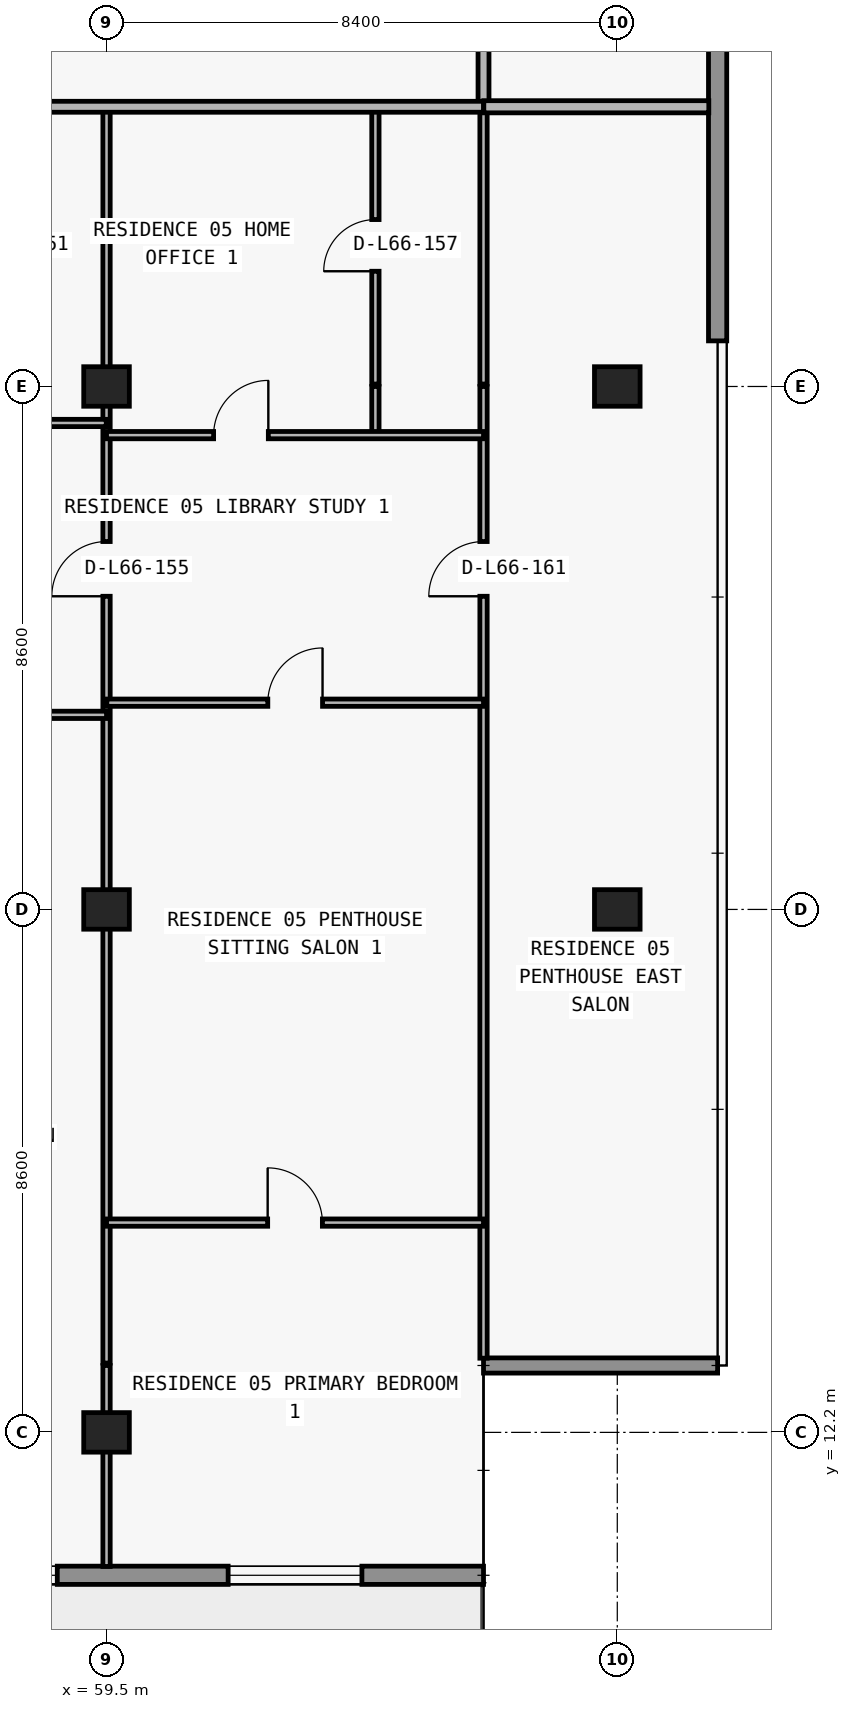
"""IFC4 building model, lengths in metres.
Left out: names, types, materials, properties, quantities, classifications, styles, units other than length and angle.
Written with IfcOpenShell. Run it as: python <this file> out.ifc"""

import sys

from ifc_helpers import new_model, si_unit, direction, frame, frame_2d, origin, origin_2d, place, context, subcontext, project, spatial, rectangle, extrude, element, fill, save


model = new_model("IFC4")
c1 = context("Model", 3, precision=1e-05, world=origin(), true_north=direction((0.0, 1.0)))
c2 = subcontext(c1, "Body", "Model", "MODEL_VIEW")
j1 = project(units=[si_unit("LENGTHUNIT", "METRE"), si_unit("PLANEANGLEUNIT", "RADIAN")], contexts=[c1])
p1 = place(None, origin())
s1 = spatial("IfcSite", under=j1, at=p1, CompositionType="ELEMENT")
p2 = place(p1, origin())
s2 = spatial("IfcBuilding", under=s1, at=p2, CompositionType="ELEMENT")
p3 = place(p2, frame((0.0, 0.0, 236.4)))
s3 = spatial("IfcBuildingStorey", under=s2, at=p3, CompositionType="ELEMENT", Elevation=236.4)
for number, where, z_axis, x_axis in (
    (1, (59.5, 12.2, 0.0), (0.0, 0.0, 1.0), (1.0, 0.0, 0.0)),
    (2, (59.5, 20.8, 0.0), (0.0, 0.0, 1.0), (1.0, 0.0, 0.0)),
    (3, (67.9, 20.8, 0.0), (0.0, 0.0, 1.0), (1.0, 0.0, 0.0)),
    (4, (59.5, 29.4, 0.0), (0.0, 0.0, 1.0), (1.0, 0.0, 0.0)),
    (5, (67.9, 29.4, 0.0), (0.0, 0.0, 1.0), (1.0, 0.0, 0.0)),
):
    element("IfcColumn", number, at=place(p3, frame(where, z_axis=z_axis, x_axis=x_axis)), inside=s3, PredefinedType="COLUMN", context=c2, shape_type="SweptSolid", body=[
        extrude(rectangle(XDim=0.75, YDim=0.65, at=origin_2d()), origin(), (0.0, 0.0, 1.0), 3.05),
    ])
p4 = place(p3, frame((65.7, 9.85, 0.0), z_axis=(0.0, 0.0, 1.0), x_axis=(-1.0, 0.0, 0.0)))
e6 = element("IfcWall", 6, at=p4, inside=s3, PredefinedType="STANDARD", context=c2, shape_type="SweptSolid", body=[
    extrude(rectangle(XDim=53.6, YDim=0.3, at=frame_2d((26.8, 0.0))), origin(), (0.0, 0.0, 1.0), 3.05),
])
p5 = place(p4, frame((49.5, 0.0, 0.0)))
e7 = element("IfcOpeningElement", 7, at=p5, cuts=e6, PredefinedType="OPENING", context=c2, shape_type="SweptSolid", body=[
    extrude(rectangle(XDim=2.0, YDim=2.3, at=frame_2d((1.0, 1.15))), frame((0.0, 0.16, 0.0), z_axis=(0.0, -1.0, 0.0), x_axis=(1.0, 0.0, 0.0)), (0.0, 0.0, 1.0), 0.32),
])
p6 = place(p4, frame((42.1, 0.0, 0.85)))
e8 = element("IfcOpeningElement", 8, at=p6, cuts=e6, PredefinedType="OPENING", context=c2, shape_type="SweptSolid", body=[
    extrude(rectangle(XDim=2.2, YDim=1.55, at=frame_2d((1.1, 0.775))), frame((0.0, 0.16, 0.0), z_axis=(0.0, -1.0, 0.0), x_axis=(1.0, 0.0, 0.0)), (0.0, 0.0, 1.0), 0.32),
])
p7 = place(p4, frame((35.69, 0.0, 0.0)))
e9 = element("IfcOpeningElement", 9, at=p7, cuts=e6, PredefinedType="OPENING", context=c2, shape_type="SweptSolid", body=[
    extrude(rectangle(XDim=2.0, YDim=2.3, at=frame_2d((1.0, 1.15))), frame((0.0, 0.16, 0.0), z_axis=(0.0, -1.0, 0.0), x_axis=(1.0, 0.0, 0.0)), (0.0, 0.0, 1.0), 0.32),
])
p8 = place(p4, frame((31.59, 0.0, 0.85)))
e10 = element("IfcOpeningElement", 10, at=p8, cuts=e6, PredefinedType="OPENING", context=c2, shape_type="SweptSolid", body=[
    extrude(rectangle(XDim=1.8, YDim=1.55, at=frame_2d((0.9, 0.775))), frame((0.0, 0.16, 0.0), z_axis=(0.0, -1.0, 0.0), x_axis=(1.0, 0.0, 0.0)), (0.0, 0.0, 1.0), 0.32),
])
p9 = place(p4, frame((23.914, 0.0, 0.85)))
e11 = element("IfcOpeningElement", 11, at=p9, cuts=e6, PredefinedType="OPENING", context=c2, shape_type="SweptSolid", body=[
    extrude(rectangle(XDim=2.2, YDim=1.55, at=frame_2d((1.1, 0.775))), frame((0.0, 0.16, 0.0), z_axis=(0.0, -1.0, 0.0), x_axis=(1.0, 0.0, 0.0)), (0.0, 0.0, 1.0), 0.32),
])
p10 = place(p4, frame((19.69, 0.0, 0.0)))
e12 = element("IfcOpeningElement", 12, at=p10, cuts=e6, PredefinedType="OPENING", context=c2, shape_type="SweptSolid", body=[
    extrude(rectangle(XDim=2.0, YDim=2.3, at=frame_2d((1.0, 1.15))), frame((0.0, 0.16, 0.0), z_axis=(0.0, -1.0, 0.0), x_axis=(1.0, 0.0, 0.0)), (0.0, 0.0, 1.0), 0.32),
])
p11 = place(p4, frame((15.59, 0.0, 0.85)))
e13 = element("IfcOpeningElement", 13, at=p11, cuts=e6, PredefinedType="OPENING", context=c2, shape_type="SweptSolid", body=[
    extrude(rectangle(XDim=1.8, YDim=1.55, at=frame_2d((0.9, 0.775))), frame((0.0, 0.16, 0.0), z_axis=(0.0, -1.0, 0.0), x_axis=(1.0, 0.0, 0.0)), (0.0, 0.0, 1.0), 0.32),
])
p12 = place(p4, frame((11.69, 0.0, 0.0)))
e14 = element("IfcOpeningElement", 14, at=p12, cuts=e6, PredefinedType="OPENING", context=c2, shape_type="SweptSolid", body=[
    extrude(rectangle(XDim=2.0, YDim=2.3, at=frame_2d((1.0, 1.15))), frame((0.0, 0.16, 0.0), z_axis=(0.0, -1.0, 0.0), x_axis=(1.0, 0.0, 0.0)), (0.0, 0.0, 1.0), 0.32),
])
p13 = place(p4, frame((7.01, 0.0, 0.65)))
e15 = element("IfcOpeningElement", 15, at=p13, cuts=e6, PredefinedType="OPENING", context=c2, shape_type="SweptSolid", body=[
    extrude(rectangle(XDim=2.6, YDim=1.85, at=frame_2d((1.3, 0.925))), frame((0.0, 0.16, 0.0), z_axis=(0.0, -1.0, 0.0), x_axis=(1.0, 0.0, 0.0)), (0.0, 0.0, 1.0), 0.32),
])
p14 = place(p4, frame((2.0, 0.0, 0.85)))
e16 = element("IfcOpeningElement", 16, at=p14, cuts=e6, PredefinedType="OPENING", context=c2, shape_type="SweptSolid", body=[
    extrude(rectangle(XDim=2.2, YDim=1.55, at=frame_2d((1.1, 0.775))), frame((0.0, 0.16, 0.0), z_axis=(0.0, -1.0, 0.0), x_axis=(1.0, 0.0, 0.0)), (0.0, 0.0, 1.0), 0.32),
])
p15 = place(p3, frame((65.7, 13.3, 0.0), z_axis=(0.0, 0.0, 1.0), x_axis=(1.0, 0.0, 0.0)))
e17 = element("IfcWall", 17, at=p15, inside=s3, PredefinedType="ELEMENTEDWALL", context=c2, shape_type="SweptSolid", body=[
    extrude(rectangle(XDim=3.85, YDim=0.25, at=frame_2d((1.925, 0.0))), origin(), (0.0, 0.0, 1.0), 3.05),
])
p16 = place(p3, frame((69.55, 47.0, 0.0), z_axis=(0.0, 0.0, 1.0), x_axis=(0.0, -1.0, 0.0)))
e18 = element("IfcWall", 18, at=p16, inside=s3, PredefinedType="STANDARD", context=c2, shape_type="SweptSolid", body=[
    extrude(rectangle(XDim=16.85, YDim=0.3, at=frame_2d((8.425, 0.0))), origin(), (0.0, 0.0, 1.0), 3.05),
])
p17 = place(p3, frame((59.5, 9.995, 0.0), z_axis=(0.0, 0.0, 1.0), x_axis=(0.0, 1.0, 0.0)))
e19 = element("IfcWall", 19, at=p17, inside=s3, PredefinedType="PARTITIONING", context=c2, shape_type="SweptSolid", body=[
    extrude(rectangle(XDim=3.305, YDim=0.12, at=frame_2d((1.652, 0.0))), origin(), (0.0, 0.0, 1.0), 2.263),
])
p18 = place(p3, frame((59.5, 13.34, 0.0), z_axis=(0.0, 0.0, 1.0), x_axis=(0.0, 1.0, 0.0)))
e20 = element("IfcWall", 20, at=p18, inside=s3, PredefinedType="PARTITIONING", context=c2, shape_type="SweptSolid", body=[
    extrude(rectangle(XDim=16.06, YDim=0.12, at=frame_2d((8.03, 0.0))), origin(), (0.0, 0.0, 1.0), 2.263),
])
p19 = place(p18, frame((12.61, 0.0, 0.0)))
e21 = element("IfcOpeningElement", 21, at=p19, cuts=e20, PredefinedType="OPENING", context=c2, shape_type="SweptSolid", body=[
    extrude(rectangle(XDim=0.9, YDim=2.15, at=frame_2d((0.45, 1.075))), frame((0.0, 0.07, 0.0), z_axis=(0.0, -1.0, 0.0), x_axis=(1.0, 0.0, 0.0)), (0.0, 0.0, 1.0), 0.14),
])
p20 = place(p3, frame((59.5, 29.44, 0.0), z_axis=(0.0, 0.0, 1.0), x_axis=(0.0, 1.0, 0.0)))
e22 = element("IfcWall", 22, at=p20, inside=s3, PredefinedType="PARTITIONING", context=c2, shape_type="SweptSolid", body=[
    extrude(rectangle(XDim=4.56, YDim=0.12, at=frame_2d((2.28, 0.0))), origin(), (0.0, 0.0, 1.0), 2.263),
])
p21 = place(p3, frame((63.922, 28.6, 0.0), z_axis=(0.0, 0.0, 1.0), x_axis=(0.0, 1.0, 0.0)))
e23 = element("IfcWall", 23, at=p21, inside=s3, PredefinedType="PARTITIONING", context=c2, shape_type="SweptSolid", body=[
    extrude(rectangle(XDim=0.8, YDim=0.12, at=frame_2d((0.4, 0.0))), origin(), (0.0, 0.0, 1.0), 3.05),
])
p22 = place(p3, frame((63.922, 29.44, 0.0), z_axis=(0.0, 0.0, 1.0), x_axis=(0.0, 1.0, 0.0)))
e24 = element("IfcWall", 24, at=p22, inside=s3, PredefinedType="PARTITIONING", context=c2, shape_type="SweptSolid", body=[
    extrude(rectangle(XDim=4.56, YDim=0.12, at=frame_2d((2.28, 0.0))), origin(), (0.0, 0.0, 1.0), 3.05),
])
p23 = place(p22, frame((1.855, 0.0, 0.0)))
e25 = element("IfcOpeningElement", 25, at=p23, cuts=e24, PredefinedType="OPENING", context=c2, shape_type="SweptSolid", body=[
    extrude(rectangle(XDim=0.85, YDim=2.1, at=frame_2d((0.425, 1.05))), frame((0.0, 0.07, 0.0), z_axis=(0.0, -1.0, 0.0), x_axis=(1.0, 0.0, 0.0)), (0.0, 0.0, 1.0), 0.14),
])
p24 = place(p3, frame((65.7, 13.42, 0.0), z_axis=(0.0, 0.0, 1.0), x_axis=(0.0, 1.0, 0.0)))
e26 = element("IfcWall", 26, at=p24, inside=s3, PredefinedType="PARTITIONING", context=c2, shape_type="SweptSolid", body=[
    extrude(rectangle(XDim=15.98, YDim=0.12, at=frame_2d((7.99, 0.0))), origin(), (0.0, 0.0, 1.0), 2.629),
])
p25 = place(p24, frame((12.53, 0.0, 0.0)))
e27 = element("IfcOpeningElement", 27, at=p25, cuts=e26, PredefinedType="OPENING", context=c2, shape_type="SweptSolid", body=[
    extrude(rectangle(XDim=0.9, YDim=2.15, at=frame_2d((0.45, 1.075))), frame((0.0, 0.07, 0.0), z_axis=(0.0, -1.0, 0.0), x_axis=(1.0, 0.0, 0.0)), (0.0, 0.0, 1.0), 0.14),
])
p26 = place(p3, frame((65.7, 29.44, 0.0), z_axis=(0.0, 0.0, 1.0), x_axis=(0.0, 1.0, 0.0)))
e28 = element("IfcWall", 28, at=p26, inside=s3, PredefinedType="PARTITIONING", context=c2, shape_type="SweptSolid", body=[
    extrude(rectangle(XDim=4.56, YDim=0.12, at=frame_2d((2.28, 0.0))), origin(), (0.0, 0.0, 1.0), 2.629),
])
p27 = place(p3, frame((65.7, 34.005, 0.0), z_axis=(0.0, 0.0, 1.0), x_axis=(0.0, 1.0, 0.0)))
e29 = element("IfcWall", 29, at=p27, inside=s3, PredefinedType="PARTITIONING", context=c2, shape_type="SweptSolid", body=[
    extrude(rectangle(XDim=2.995, YDim=0.18, at=frame_2d((1.498, 0.0))), origin(), (0.0, 0.0, 1.0), 2.629),
])
p28 = place(p3, frame((59.5, 15.65, 0.0), z_axis=(0.0, 0.0, 1.0), x_axis=(1.0, 0.0, 0.0)))
e30 = element("IfcWall", 30, at=p28, inside=s3, PredefinedType="PARTITIONING", context=c2, shape_type="SweptSolid", body=[
    extrude(rectangle(XDim=6.2, YDim=0.12, at=frame_2d((3.1, 0.0))), origin(), (0.0, 0.0, 1.0), 3.05),
])
p29 = place(p28, frame((2.65, 0.0, 0.0)))
e31 = element("IfcOpeningElement", 31, at=p29, cuts=e30, PredefinedType="OPENING", context=c2, shape_type="SweptSolid", body=[
    extrude(rectangle(XDim=0.9, YDim=2.15, at=frame_2d((0.45, 1.075))), frame((0.0, 0.07, 0.0), z_axis=(0.0, -1.0, 0.0), x_axis=(1.0, 0.0, 0.0)), (0.0, 0.0, 1.0), 0.14),
])
p30 = place(p3, frame((51.32, 24.0, 0.0), z_axis=(0.0, 0.0, 1.0), x_axis=(1.0, 0.0, 0.0)))
e32 = element("IfcWall", 32, at=p30, inside=s3, PredefinedType="PARTITIONING", context=c2, shape_type="SweptSolid", body=[
    extrude(rectangle(XDim=8.18, YDim=0.12, at=frame_2d((4.09, 0.0))), origin(), (0.0, 0.0, 1.0), 3.05),
])
p31 = place(p30, frame((1.33, 0.0, 0.0)))
e33 = element("IfcOpeningElement", 33, at=p31, cuts=e32, PredefinedType="OPENING", context=c2, shape_type="SweptSolid", body=[
    extrude(rectangle(XDim=0.9, YDim=2.15, at=frame_2d((0.45, 1.075))), frame((0.0, 0.07, 0.0), z_axis=(0.0, -1.0, 0.0), x_axis=(1.0, 0.0, 0.0)), (0.0, 0.0, 1.0), 0.14),
])
p32 = place(p3, frame((59.505, 24.2, 0.0), z_axis=(0.0, 0.0, 1.0), x_axis=(1.0, 0.0, 0.0)))
e34 = element("IfcWall", 34, at=p32, inside=s3, PredefinedType="PARTITIONING", context=c2, shape_type="SweptSolid", body=[
    extrude(rectangle(XDim=6.195, YDim=0.12, at=frame_2d((3.098, 0.0))), origin(), (0.0, 0.0, 1.0), 3.05),
])
p33 = place(p32, frame((2.647, 0.0, 0.0)))
e35 = element("IfcOpeningElement", 35, at=p33, cuts=e34, PredefinedType="OPENING", context=c2, shape_type="SweptSolid", body=[
    extrude(rectangle(XDim=0.9, YDim=2.15, at=frame_2d((0.45, 1.075))), frame((0.0, 0.07, 0.0), z_axis=(0.0, -1.0, 0.0), x_axis=(1.0, 0.0, 0.0)), (0.0, 0.0, 1.0), 0.14),
])
p34 = place(p3, frame((59.5, 28.6, 0.0), z_axis=(0.0, 0.0, 1.0), x_axis=(1.0, 0.0, 0.0)))
e36 = element("IfcWall", 36, at=p34, inside=s3, PredefinedType="PARTITIONING", context=c2, shape_type="SweptSolid", body=[
    extrude(rectangle(XDim=6.2, YDim=0.12, at=frame_2d((3.1, 0.0))), origin(), (0.0, 0.0, 1.0), 3.05),
])
p35 = place(p34, frame((1.761, 0.0, 0.0)))
e37 = element("IfcOpeningElement", 37, at=p35, cuts=e36, PredefinedType="OPENING", context=c2, shape_type="SweptSolid", body=[
    extrude(rectangle(XDim=0.9, YDim=2.15, at=frame_2d((0.45, 1.075))), frame((0.0, 0.07, 0.0), z_axis=(0.0, -1.0, 0.0), x_axis=(1.0, 0.0, 0.0)), (0.0, 0.0, 1.0), 0.14),
])
p36 = place(p3, frame((51.32, 28.8, 0.0), z_axis=(0.0, 0.0, 1.0), x_axis=(1.0, 0.0, 0.0)))
e38 = element("IfcWall", 38, at=p36, inside=s3, PredefinedType="PARTITIONING", context=c2, shape_type="SweptSolid", body=[
    extrude(rectangle(XDim=8.175, YDim=0.12, at=frame_2d((4.087, 0.0))), origin(), (0.0, 0.0, 1.0), 3.05),
])
p37 = place(p36, frame((1.33, 0.0, 0.0)))
e39 = element("IfcOpeningElement", 39, at=p37, cuts=e38, PredefinedType="OPENING", context=c2, shape_type="SweptSolid", body=[
    extrude(rectangle(XDim=0.9, YDim=2.15, at=frame_2d((0.45, 1.075))), frame((0.0, 0.07, 0.0), z_axis=(0.0, -1.0, 0.0), x_axis=(1.0, 0.0, 0.0)), (0.0, 0.0, 1.0), 0.14),
])
p38 = place(p3, frame((12.105, 34.0, 0.0), z_axis=(0.0, 0.0, 1.0), x_axis=(1.0, 0.0, 0.0)))
e40 = element("IfcWall", 40, at=p38, inside=s3, PredefinedType="PARTITIONING", context=c2, shape_type="SweptSolid", body=[
    extrude(rectangle(XDim=53.595, YDim=0.18, at=frame_2d((26.797, 0.0))), origin(), (0.0, 0.0, 1.0), 3.05),
])
p39 = place(p38, frame((1.607, 0.0, 0.0)))
e41 = element("IfcOpeningElement", 41, at=p39, cuts=e40, PredefinedType="OPENING", context=c2, shape_type="SweptSolid", body=[
    extrude(rectangle(XDim=1.0, YDim=2.2, at=frame_2d((0.5, 1.1))), frame((0.0, 0.1, 0.0), z_axis=(0.0, -1.0, 0.0), x_axis=(1.0, 0.0, 0.0)), (0.0, 0.0, 1.0), 0.2),
])
p40 = place(p38, frame((17.057, 0.0, 0.0)))
e42 = element("IfcOpeningElement", 42, at=p40, cuts=e40, PredefinedType="OPENING", context=c2, shape_type="SweptSolid", body=[
    extrude(rectangle(XDim=1.0, YDim=2.2, at=frame_2d((0.5, 1.1))), frame((0.0, 0.1, 0.0), z_axis=(0.0, -1.0, 0.0), x_axis=(1.0, 0.0, 0.0)), (0.0, 0.0, 1.0), 0.2),
])
p41 = place(p38, frame((25.242, 0.0, 0.0)))
e43 = element("IfcOpeningElement", 43, at=p41, cuts=e40, PredefinedType="OPENING", context=c2, shape_type="SweptSolid", body=[
    extrude(rectangle(XDim=1.0, YDim=2.2, at=frame_2d((0.5, 1.1))), frame((0.0, 0.1, 0.0), z_axis=(0.0, -1.0, 0.0), x_axis=(1.0, 0.0, 0.0)), (0.0, 0.0, 1.0), 0.2),
])
p42 = place(p38, frame((33.092, 0.0, 0.0)))
e44 = element("IfcOpeningElement", 44, at=p42, cuts=e40, PredefinedType="OPENING", context=c2, shape_type="SweptSolid", body=[
    extrude(rectangle(XDim=1.0, YDim=2.2, at=frame_2d((0.5, 1.1))), frame((0.0, 0.1, 0.0), z_axis=(0.0, -1.0, 0.0), x_axis=(1.0, 0.0, 0.0)), (0.0, 0.0, 1.0), 0.2),
])
p43 = place(p38, frame((41.705, 0.0, 0.0)))
e45 = element("IfcOpeningElement", 45, at=p43, cuts=e40, PredefinedType="OPENING", context=c2, shape_type="SweptSolid", body=[
    extrude(rectangle(XDim=1.0, YDim=2.2, at=frame_2d((0.5, 1.1))), frame((0.0, 0.1, 0.0), z_axis=(0.0, -1.0, 0.0), x_axis=(1.0, 0.0, 0.0)), (0.0, 0.0, 1.0), 0.2),
])
p44 = place(p3, frame((65.705, 34.0, 0.0), z_axis=(0.0, 0.0, 1.0), x_axis=(1.0, 0.0, 0.0)))
e46 = element("IfcWall", 46, at=p44, inside=s3, PredefinedType="PARTITIONING", context=c2, shape_type="SweptSolid", body=[
    extrude(rectangle(XDim=3.7, YDim=0.2, at=frame_2d((1.85, 0.0))), origin(), (0.0, 0.0, 1.0), 3.05),
])
p45 = place(p13, origin())
e47 = element("IfcWindow", 47, at=p45, inside=s3, PartitioningType="SINGLE_PANEL", PredefinedType="WINDOW", context=c2, shape_type="SweptSolid", body=[
    extrude(rectangle(XDim=2.6, YDim=1.85, at=frame_2d((1.3, 0.925))), frame((0.0, 0.03, 0.0), z_axis=(0.0, -1.0, 0.0), x_axis=(1.0, 0.0, 0.0)), (0.0, 0.0, 1.0), 0.06),
])
fill(e15, e47)
p46 = place(p14, origin())
e48 = element("IfcWindow", 48, at=p46, inside=s3, PartitioningType="SINGLE_PANEL", PredefinedType="WINDOW", context=c2, shape_type="SweptSolid", body=[
    extrude(rectangle(XDim=2.2, YDim=1.55, at=frame_2d((1.1, 0.775))), frame((0.0, 0.03, 0.0), z_axis=(0.0, -1.0, 0.0), x_axis=(1.0, 0.0, 0.0)), (0.0, 0.0, 1.0), 0.06),
])
fill(e16, e48)
p47 = place(p19, origin())
e49 = element("IfcDoor", 49, at=p47, inside=s3, OperationType="SINGLE_SWING_LEFT", PredefinedType="DOOR", context=c2, shape_type="SweptSolid", body=[
    extrude(rectangle(XDim=0.9, YDim=2.15, at=frame_2d((0.45, 1.075))), frame((0.0, 0.025, 0.0), z_axis=(0.0, -1.0, 0.0), x_axis=(1.0, 0.0, 0.0)), (0.0, 0.0, 1.0), 0.05),
])
fill(e21, e49)
p48 = place(p35, origin())
e50 = element("IfcDoor", 50, at=p48, inside=s3, OperationType="SINGLE_SWING_RIGHT", PredefinedType="DOOR", context=c2, shape_type="SweptSolid", body=[
    extrude(rectangle(XDim=0.9, YDim=2.15, at=frame_2d((0.45, 1.075))), frame((0.0, 0.025, 0.0), z_axis=(0.0, -1.0, 0.0), x_axis=(1.0, 0.0, 0.0)), (0.0, 0.0, 1.0), 0.05),
])
fill(e37, e50)
p49 = place(p23, origin())
e51 = element("IfcDoor", 51, at=p49, inside=s3, OperationType="SINGLE_SWING_LEFT", PredefinedType="DOOR", context=c2, shape_type="SweptSolid", body=[
    extrude(rectangle(XDim=0.85, YDim=2.1, at=frame_2d((0.425, 1.05))), frame((0.0, 0.025, 0.0), z_axis=(0.0, -1.0, 0.0), x_axis=(1.0, 0.0, 0.0)), (0.0, 0.0, 1.0), 0.05),
])
fill(e25, e51)
p50 = place(p33, origin())
e52 = element("IfcDoor", 52, at=p50, inside=s3, OperationType="SINGLE_SWING_RIGHT", PredefinedType="DOOR", context=c2, shape_type="SweptSolid", body=[
    extrude(rectangle(XDim=0.9, YDim=2.15, at=frame_2d((0.45, 1.075))), frame((0.0, 0.025, 0.0), z_axis=(0.0, -1.0, 0.0), x_axis=(1.0, 0.0, 0.0)), (0.0, 0.0, 1.0), 0.05),
])
fill(e35, e52)
p51 = place(p29, origin())
e53 = element("IfcDoor", 53, at=p51, inside=s3, OperationType="SINGLE_SWING_LEFT", PredefinedType="DOOR", context=c2, shape_type="SweptSolid", body=[
    extrude(rectangle(XDim=0.9, YDim=2.15, at=frame_2d((0.45, 1.075))), frame((0.0, 0.025, 0.0), z_axis=(0.0, -1.0, 0.0), x_axis=(1.0, 0.0, 0.0)), (0.0, 0.0, 1.0), 0.05),
])
fill(e31, e53)
p52 = place(p25, origin())
e54 = element("IfcDoor", 54, at=p52, inside=s3, OperationType="SINGLE_SWING_LEFT", PredefinedType="DOOR", context=c2, shape_type="SweptSolid", body=[
    extrude(rectangle(XDim=0.9, YDim=2.15, at=frame_2d((0.45, 1.075))), frame((0.0, 0.025, 0.0), z_axis=(0.0, -1.0, 0.0), x_axis=(1.0, 0.0, 0.0)), (0.0, 0.0, 1.0), 0.05),
])
fill(e27, e54)
save(model, sys.argv[1])
